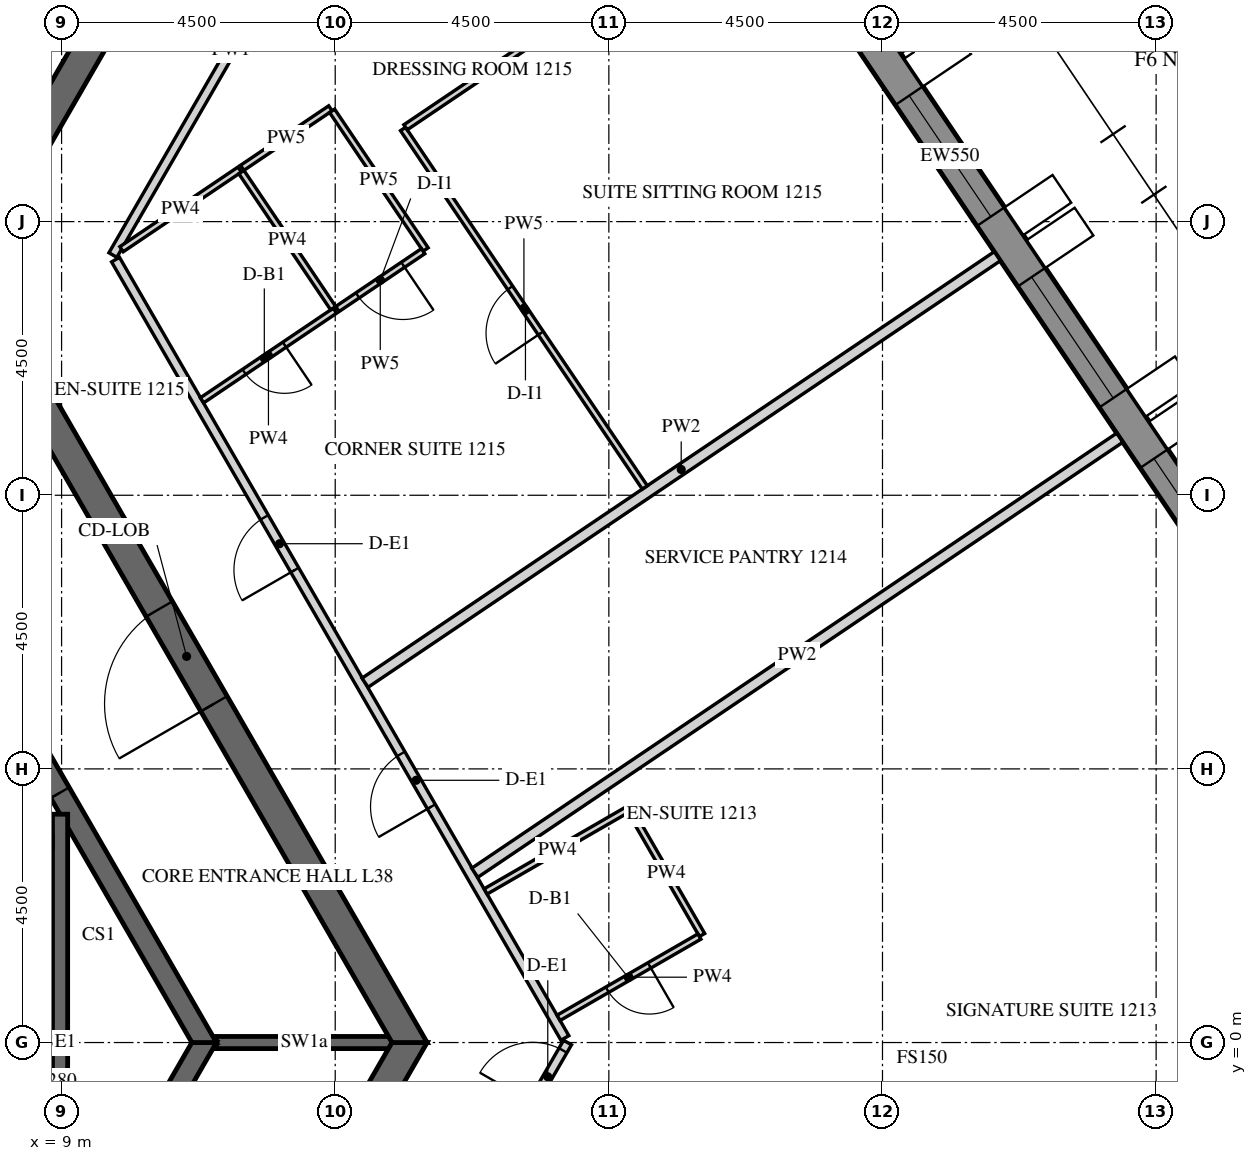
"""IFC4 building model, lengths in metres.
Left out: names, types, materials, properties, quantities, classifications, styles, units other than length and angle.
Written with IfcOpenShell. Run it as: python <this file> out.ifc"""

import sys

from ifc_helpers import new_model, si_unit, direction, frame, frame_2d, origin, place, context, subcontext, project, spatial, polyline, rectangle, outline, extrude, element, fill, save


model = new_model("IFC4")
c1 = context("Model", 3, precision=1e-05, world=origin(), true_north=direction((0.0, 1.0)))
c2 = subcontext(c1, "Body", "Model", "MODEL_VIEW")
j1 = project(units=[si_unit("LENGTHUNIT", "METRE"), si_unit("PLANEANGLEUNIT", "RADIAN")], contexts=[c1])
p1 = place(None, origin())
s1 = spatial("IfcSite", under=j1, at=p1, CompositionType="ELEMENT")
p2 = place(p1, origin())
s2 = spatial("IfcBuilding", under=s1, at=p2, CompositionType="ELEMENT")
p3 = place(p2, frame((0.0, 0.0, 164.4)))
s3 = spatial("IfcBuildingStorey", under=s2, at=p3, CompositionType="ELEMENT", Elevation=164.4)
p4 = place(p3, frame((31.371, 3.071, -0.15), z_axis=(0.0, 0.0, 1.0), x_axis=(-0.559189891278, 0.829039604297, 0.0)))
e1 = element("IfcWall", 1, at=p4, inside=s3, PredefinedType="SOLIDWALL", context=c2, shape_type="SweptSolid", body=[
    extrude(outline(polyline([(-0.026, -0.275), (27.781, -0.275), (27.736, 0.275), (0.026, 0.275), (-0.026, -0.275)])), origin(), (0.0, 0.0, 1.0), 3.9),
])
p5 = place(p4, frame((1.879, 0.0, 1.05)))
e2 = element("IfcOpeningElement", 2, at=p5, cuts=e1, PredefinedType="OPENING", context=c2, shape_type="SweptSolid", body=[
    extrude(rectangle(XDim=2.4, YDim=2.4, at=frame_2d((1.2, 1.2))), frame((0.0, 0.285, 0.0), z_axis=(0.0, -1.0, 0.0), x_axis=(1.0, 0.0, 0.0)), (0.0, 0.0, 1.0), 0.57),
])
p6 = place(p4, frame((5.479, 0.0, 1.05)))
e3 = element("IfcOpeningElement", 3, at=p6, cuts=e1, PredefinedType="OPENING", context=c2, shape_type="SweptSolid", body=[
    extrude(rectangle(XDim=2.4, YDim=2.4, at=frame_2d((1.2, 1.2))), frame((0.0, 0.285, 0.0), z_axis=(0.0, -1.0, 0.0), x_axis=(1.0, 0.0, 0.0)), (0.0, 0.0, 1.0), 0.57),
])
p7 = place(p4, frame((9.079, 0.0, 1.05)))
e4 = element("IfcOpeningElement", 4, at=p7, cuts=e1, PredefinedType="OPENING", context=c2, shape_type="SweptSolid", body=[
    extrude(rectangle(XDim=2.4, YDim=2.4, at=frame_2d((1.2, 1.2))), frame((0.0, 0.285, 0.0), z_axis=(0.0, -1.0, 0.0), x_axis=(1.0, 0.0, 0.0)), (0.0, 0.0, 1.0), 0.57),
])
p8 = place(p4, frame((12.679, 0.0, 1.05)))
e5 = element("IfcOpeningElement", 5, at=p8, cuts=e1, PredefinedType="OPENING", context=c2, shape_type="SweptSolid", body=[
    extrude(rectangle(XDim=2.4, YDim=2.4, at=frame_2d((1.2, 1.2))), frame((0.0, 0.285, 0.0), z_axis=(0.0, -1.0, 0.0), x_axis=(1.0, 0.0, 0.0)), (0.0, 0.0, 1.0), 0.57),
])
p9 = place(p4, frame((16.279, 0.0, 1.05)))
e6 = element("IfcOpeningElement", 6, at=p9, cuts=e1, PredefinedType="OPENING", context=c2, shape_type="SweptSolid", body=[
    extrude(rectangle(XDim=2.4, YDim=2.4, at=frame_2d((1.2, 1.2))), frame((0.0, 0.285, 0.0), z_axis=(0.0, -1.0, 0.0), x_axis=(1.0, 0.0, 0.0)), (0.0, 0.0, 1.0), 0.57),
])
p10 = place(p4, frame((19.879, 0.0, 1.05)))
e7 = element("IfcOpeningElement", 7, at=p10, cuts=e1, PredefinedType="OPENING", context=c2, shape_type="SweptSolid", body=[
    extrude(rectangle(XDim=2.4, YDim=2.4, at=frame_2d((1.2, 1.2))), frame((0.0, 0.285, 0.0), z_axis=(0.0, -1.0, 0.0), x_axis=(1.0, 0.0, 0.0)), (0.0, 0.0, 1.0), 0.57),
])
p11 = place(p4, frame((23.479, 0.0, 1.05)))
e8 = element("IfcOpeningElement", 8, at=p11, cuts=e1, PredefinedType="OPENING", context=c2, shape_type="SweptSolid", body=[
    extrude(rectangle(XDim=2.4, YDim=2.4, at=frame_2d((1.2, 1.2))), frame((0.0, 0.285, 0.0), z_axis=(0.0, -1.0, 0.0), x_axis=(1.0, 0.0, 0.0)), (0.0, 0.0, 1.0), 0.57),
])
p12 = place(p3, frame((7.361, -12.75, -0.15), z_axis=(0.0, 0.0, 1.0), x_axis=(0.50000571537, 0.866022103989, 0.0)))
e9 = element("IfcWall", 9, at=p12, inside=s3, PredefinedType="SHEAR", context=c2, shape_type="SweptSolid", body=[
    extrude(outline(polyline([(-0.144, -0.25), (14.867, -0.25), (14.578, 0.25), (0.144, 0.25), (-0.144, -0.25)])), origin(), (0.0, 0.0, 1.0), 3.9),
])
p13 = place(p12, frame((6.49, 0.0, 0.15)))
e10 = element("IfcOpeningElement", 10, at=p13, cuts=e9, PredefinedType="OPENING", context=c2, shape_type="SweptSolid", body=[
    extrude(rectangle(XDim=1.8, YDim=2.4, at=frame_2d((0.9, 1.2))), frame((0.0, 0.26, 0.0), z_axis=(0.0, -1.0, 0.0), x_axis=(1.0, 0.0, 0.0)), (0.0, 0.0, 1.0), 0.52),
])
p14 = place(p3, frame((14.722, 0.0, -0.15), z_axis=(0.0, 0.0, 1.0), x_axis=(-0.50000571537, 0.866022103989, 0.0)))
e11 = element("IfcWall", 11, at=p14, inside=s3, PredefinedType="SHEAR", context=c2, shape_type="SweptSolid", body=[
    extrude(outline(polyline([(-0.144, -0.25), (14.867, -0.25), (14.578, 0.25), (0.144, 0.25), (-0.144, -0.25)])), origin(), (0.0, 0.0, 1.0), 3.9),
])
p15 = place(p14, frame((6.432, 0.0, 0.15)))
e12 = element("IfcOpeningElement", 12, at=p15, cuts=e11, PredefinedType="OPENING", context=c2, shape_type="SweptSolid", body=[
    extrude(rectangle(XDim=1.8, YDim=2.4, at=frame_2d((0.9, 1.2))), frame((0.0, 0.26, 0.0), z_axis=(0.0, -1.0, 0.0), x_axis=(1.0, 0.0, 0.0)), (0.0, 0.0, 1.0), 0.52),
])
p16 = place(p3, frame((7.506, 13.0, -0.15), z_axis=(0.0, 0.0, 1.0), x_axis=(0.499988271576, 0.866032175087, 0.0)))
e13 = element("IfcWall", 13, at=p16, inside=s3, PredefinedType="SHEAR", context=c2, shape_type="SweptSolid", body=[
    extrude(rectangle(XDim=15.424, YDim=0.5, at=frame_2d((7.712, 0.0))), origin(), (0.0, 0.0, 1.0), 3.9),
])
p17 = place(p16, frame((6.812, 0.0, 0.15)))
e14 = element("IfcOpeningElement", 14, at=p17, cuts=e13, PredefinedType="OPENING", context=c2, shape_type="SweptSolid", body=[
    extrude(rectangle(XDim=1.8, YDim=2.4, at=frame_2d((0.9, 1.2))), frame((0.0, 0.26, 0.0), z_axis=(0.0, -1.0, 0.0), x_axis=(1.0, 0.0, 0.0)), (0.0, 0.0, 1.0), 0.52),
])
p18 = place(p3, frame((5.673, -9.825, -0.15), z_axis=(0.0, 0.0, 1.0), x_axis=(0.499995046907, 0.866028263435, 0.0)))
e15 = element("IfcWall", 15, at=p18, inside=s3, PredefinedType="SHEAR", context=c2, shape_type="SweptSolid", body=[
    extrude(outline(polyline([(-0.101, -0.175), (11.446, -0.175), (11.244, 0.175), (0.101, 0.175), (-0.101, -0.175)])), origin(), (0.0, 0.0, 1.0), 3.9),
])
p19 = place(p18, frame((4.801, 0.0, 0.15)))
e16 = element("IfcOpeningElement", 16, at=p19, cuts=e15, PredefinedType="OPENING", context=c2, shape_type="SweptSolid", body=[
    extrude(rectangle(XDim=1.8, YDim=2.4, at=frame_2d((0.9, 1.2))), frame((0.0, 0.185, 0.0), z_axis=(0.0, -1.0, 0.0), x_axis=(1.0, 0.0, 0.0)), (0.0, 0.0, 1.0), 0.37),
])
p20 = place(p3, frame((11.345, 0.0, -0.15), z_axis=(0.0, 0.0, 1.0), x_axis=(-0.499995046907, 0.866028263435, 0.0)))
e17 = element("IfcWall", 17, at=p20, inside=s3, PredefinedType="SHEAR", context=c2, shape_type="SweptSolid", body=[
    extrude(outline(polyline([(-0.101, -0.175), (11.446, -0.175), (11.244, 0.175), (0.101, 0.175), (-0.101, -0.175)])), origin(), (0.0, 0.0, 1.0), 3.9),
])
p21 = place(p20, frame((4.744, 0.0, 0.15)))
e18 = element("IfcOpeningElement", 18, at=p21, cuts=e17, PredefinedType="OPENING", context=c2, shape_type="SweptSolid", body=[
    extrude(rectangle(XDim=1.8, YDim=2.4, at=frame_2d((0.9, 1.2))), frame((0.0, 0.185, 0.0), z_axis=(0.0, -1.0, 0.0), x_axis=(1.0, 0.0, 0.0)), (0.0, 0.0, 1.0), 0.37),
])
p22 = place(p3, frame((11.547, 0.0, -0.15), z_axis=(0.0, 0.0, 1.0), x_axis=(1.0, 0.0, 0.0)))
e19 = element("IfcWall", 19, at=p22, inside=s3, PredefinedType="SHEAR", context=c2, shape_type="SweptSolid", body=[
    extrude(rectangle(XDim=2.887, YDim=0.2, at=frame_2d((1.443, 0.0))), origin(), (0.0, 0.0, 1.0), 3.9),
])
p23 = place(p3, frame((8.975, -3.755, -0.25), z_axis=(0.0, 0.0, 1.0), x_axis=(0.0, 1.0, 0.0)))
e20 = element("IfcWall", 20, at=p23, inside=s3, PredefinedType="SHEAR", context=c2, shape_type="SweptSolid", body=[
    extrude(rectangle(XDim=7.51, YDim=0.25, at=frame_2d((3.755, 0.0))), origin(), (0.0, 0.0, 1.0), 3.9),
])
p24 = place(p3, frame((5.9, 3.3, -0.25), z_axis=(0.0, 0.0, 1.0), x_axis=(1.0, 0.0, 0.0)))
e21 = element("IfcWall", 21, at=p24, inside=s3, PredefinedType="SHEAR", context=c2, shape_type="SweptSolid", body=[
    extrude(rectangle(XDim=2.95, YDim=0.2, at=frame_2d((1.475, 0.0))), origin(), (0.0, 0.0, 1.0), 3.9),
])
p25 = place(p3, frame((10.149, 21.678, 0.0), z_axis=(0.0, 0.0, 1.0), x_axis=(-0.499993780622, -0.866028994514, 0.0)))
e22 = element("IfcWall", 22, at=p25, inside=s3, PredefinedType="PARTITIONING", context=c2, shape_type="SweptSolid", body=[
    extrude(rectangle(XDim=7.711, YDim=0.15, at=frame_2d((3.855, 0.0))), origin(), (0.0, 0.0, 1.0), 2.988),
])
p26 = place(p3, frame((10.887, -11.144, 0.0), z_axis=(0.0, 0.0, 1.0), x_axis=(0.500006037985, 0.866021917724, 0.0)))
e23 = element("IfcWall", 23, at=p26, inside=s3, PredefinedType="PARTITIONING", context=c2, shape_type="SweptSolid", body=[
    extrude(rectangle(XDim=12.867, YDim=0.15, at=frame_2d((6.434, 0.0))), origin(), (0.0, 0.0, 1.0), 2.988),
])
p27 = place(p26, frame((6.225, 0.0, 0.0)))
e24 = element("IfcOpeningElement", 24, at=p27, cuts=e23, PredefinedType="OPENING", context=c2, shape_type="SweptSolid", body=[
    extrude(rectangle(XDim=1.0, YDim=2.1, at=frame_2d((0.5, 1.05))), frame((0.0, 0.085, 0.0), z_axis=(0.0, -1.0, 0.0), x_axis=(1.0, 0.0, 0.0)), (0.0, 0.0, 1.0), 0.17),
])
p28 = place(p26, frame((11.717, 0.0, 0.0)))
e25 = element("IfcOpeningElement", 25, at=p28, cuts=e23, PredefinedType="OPENING", context=c2, shape_type="SweptSolid", body=[
    extrude(rectangle(XDim=1.0, YDim=2.1, at=frame_2d((0.5, 1.05))), frame((0.0, 0.085, 0.0), z_axis=(0.0, -1.0, 0.0), x_axis=(1.0, 0.0, 0.0)), (0.0, 0.0, 1.0), 0.17),
])
p29 = place(p3, frame((17.277, 0.075, 0.0), z_axis=(0.0, 0.0, 1.0), x_axis=(-0.499988884089, 0.866031821464, 0.0)))
e26 = element("IfcWall", 26, at=p29, inside=s3, PredefinedType="PARTITIONING", context=c2, shape_type="SweptSolid", body=[
    extrude(rectangle(XDim=14.78, YDim=0.15, at=frame_2d((7.39, 0.0))), origin(), (0.0, 0.0, 1.0), 2.988),
])
p30 = place(p29, frame((4.393, 0.0, 0.0)))
e27 = element("IfcOpeningElement", 27, at=p30, cuts=e26, PredefinedType="OPENING", context=c2, shape_type="SweptSolid", body=[
    extrude(rectangle(XDim=1.0, YDim=2.1, at=frame_2d((0.5, 1.05))), frame((0.0, 0.085, 0.0), z_axis=(0.0, -1.0, 0.0), x_axis=(1.0, 0.0, 0.0)), (0.0, 0.0, 1.0), 0.17),
])
p31 = place(p29, frame((8.885, 0.0, 0.0)))
e28 = element("IfcOpeningElement", 28, at=p31, cuts=e26, PredefinedType="OPENING", context=c2, shape_type="SweptSolid", body=[
    extrude(rectangle(XDim=1.0, YDim=2.1, at=frame_2d((0.5, 1.05))), frame((0.0, 0.085, 0.0), z_axis=(0.0, -1.0, 0.0), x_axis=(1.0, 0.0, 0.0)), (0.0, 0.0, 1.0), 0.17),
])
p32 = place(p3, frame((9.844, 12.95, 0.0), z_axis=(0.0, 0.0, 1.0), x_axis=(0.500003831281, 0.866023191782, 0.0)))
e29 = element("IfcWall", 29, at=p32, inside=s3, PredefinedType="PARTITIONING", context=c2, shape_type="SweptSolid", body=[
    extrude(rectangle(XDim=7.786, YDim=0.15, at=frame_2d((3.893, 0.0))), origin(), (0.0, 0.0, 1.0), 2.988),
])
p33 = place(p3, frame((15.973, 2.484, 0.0), z_axis=(0.0, 0.0, 1.0), x_axis=(0.866051307416, 0.49995513091, 0.0)))
e30 = element("IfcWall", 30, at=p33, inside=s3, PredefinedType="PARTITIONING", context=c2, shape_type="SweptSolid", body=[
    extrude(rectangle(XDim=2.725, YDim=0.1, at=frame_2d((1.362, 0.0))), origin(), (0.0, 0.0, 1.0), 2.988),
])
p34 = place(p3, frame((18.358, 3.803, 0.0), z_axis=(0.0, 0.0, 1.0), x_axis=(0.500016218704, -0.866016039709, 0.0)))
e31 = element("IfcWall", 31, at=p34, inside=s3, PredefinedType="PARTITIONING", context=c2, shape_type="SweptSolid", body=[
    extrude(rectangle(XDim=2.35, YDim=0.1, at=frame_2d((1.175, 0.0))), origin(), (0.0, 0.0, 1.0), 2.988),
])
p35 = place(p3, frame((19.49, 1.743, 0.0), z_axis=(0.0, 0.0, 1.0), x_axis=(-0.866004723184, -0.50003581814, 0.0)))
e32 = element("IfcWall", 32, at=p35, inside=s3, PredefinedType="PARTITIONING", context=c2, shape_type="SweptSolid", body=[
    extrude(rectangle(XDim=2.675, YDim=0.1, at=frame_2d((1.337, 0.0))), origin(), (0.0, 0.0, 1.0), 2.988),
])
p36 = place(p35, frame((0.95, 0.0, 0.0)))
e33 = element("IfcOpeningElement", 33, at=p36, cuts=e32, PredefinedType="OPENING", context=c2, shape_type="SweptSolid", body=[
    extrude(rectangle(XDim=0.8, YDim=2.1, at=frame_2d((0.4, 1.05))), frame((0.0, 0.06, 0.0), z_axis=(0.0, -1.0, 0.0), x_axis=(1.0, 0.0, 0.0)), (0.0, 0.0, 1.0), 0.12),
])
p37 = place(p3, frame((26.402, 9.946, 0.0), z_axis=(0.0, 0.0, 1.0), x_axis=(-0.829037771727, -0.559192608187, 0.0)))
e34 = element("IfcWall", 34, at=p37, inside=s3, PredefinedType="PARTITIONING", context=c2, shape_type="SweptSolid", body=[
    extrude(rectangle(XDim=12.794, YDim=0.18, at=frame_2d((6.397, 0.0))), origin(), (0.0, 0.0, 1.0), 2.988),
])
p38 = place(p3, frame((24.389, 12.931, 0.0), z_axis=(0.0, 0.0, 1.0), x_axis=(-0.829040439793, -0.559188652593, 0.0)))
e35 = element("IfcWall", 35, at=p38, inside=s3, PredefinedType="PARTITIONING", context=c2, shape_type="SweptSolid", body=[
    extrude(rectangle(XDim=12.542, YDim=0.18, at=frame_2d((6.271, 0.0))), origin(), (0.0, 0.0, 1.0), 2.988),
])
p39 = place(p3, frame((9.986, 13.046, 0.0), z_axis=(0.0, 0.0, 1.0), x_axis=(0.829041811541, 0.559186618865, 0.0)))
e36 = element("IfcWall", 36, at=p39, inside=s3, PredefinedType="PARTITIONING", context=c2, shape_type="SweptSolid", body=[
    extrude(rectangle(XDim=2.344, YDim=0.1, at=frame_2d((1.172, 0.0))), origin(), (0.0, 0.0, 1.0), 2.988),
])
p40 = place(p3, frame((13.495, 12.035, 0.0), z_axis=(0.0, 0.0, 1.0), x_axis=(-0.829031183816, -0.55920237505, 0.0)))
e37 = element("IfcWall", 37, at=p40, inside=s3, PredefinedType="PARTITIONING", context=c2, shape_type="SweptSolid", body=[
    extrude(rectangle(XDim=2.636, YDim=0.1, at=frame_2d((1.318, 0.0))), origin(), (0.0, 0.0, 1.0), 2.988),
])
p41 = place(p40, frame((1.0, 0.0, 0.0)))
e38 = element("IfcOpeningElement", 38, at=p41, cuts=e37, PredefinedType="OPENING", context=c2, shape_type="SweptSolid", body=[
    extrude(rectangle(XDim=0.8, YDim=2.1, at=frame_2d((0.4, 1.05))), frame((0.0, 0.06, 0.0), z_axis=(0.0, -1.0, 0.0), x_axis=(1.0, 0.0, 0.0)), (0.0, 0.0, 1.0), 0.12),
])
p42 = place(p3, frame((11.97, 14.384, 0.0), z_axis=(0.0, 0.0, 1.0), x_axis=(0.828968337787, 0.559295534532, 0.0)))
e39 = element("IfcWall", 39, at=p42, inside=s3, PredefinedType="PARTITIONING", context=c2, shape_type="SweptSolid", body=[
    extrude(rectangle(XDim=1.75, YDim=0.1, at=frame_2d((0.875, 0.0))), origin(), (0.0, 0.0, 1.0), 2.988),
])
p43 = place(p3, frame((13.449, 15.322, 0.0), z_axis=(0.0, 0.0, 1.0), x_axis=(0.559158698756, -0.8290606429, 0.0)))
e40 = element("IfcWall", 40, at=p43, inside=s3, PredefinedType="PARTITIONING", context=c2, shape_type="SweptSolid", body=[
    extrude(rectangle(XDim=2.75, YDim=0.1, at=frame_2d((1.375, 0.0))), origin(), (0.0, 0.0, 1.0), 2.988),
])
p44 = place(p3, frame((14.946, 13.014, 0.0), z_axis=(0.0, 0.0, 1.0), x_axis=(-0.829033422808, -0.559199055675, 0.0)))
e41 = element("IfcWall", 41, at=p44, inside=s3, PredefinedType="PARTITIONING", context=c2, shape_type="SweptSolid", body=[
    extrude(rectangle(XDim=1.7, YDim=0.1, at=frame_2d((0.85, 0.0))), origin(), (0.0, 0.0, 1.0), 2.988),
])
p45 = place(p44, frame((0.4, 0.0, 0.0)))
e42 = element("IfcOpeningElement", 42, at=p45, cuts=e41, PredefinedType="OPENING", context=c2, shape_type="SweptSolid", body=[
    extrude(rectangle(XDim=0.9, YDim=2.1, at=frame_2d((0.45, 1.05))), frame((0.0, 0.06, 0.0), z_axis=(0.0, -1.0, 0.0), x_axis=(1.0, 0.0, 0.0)), (0.0, 0.0, 1.0), 0.12),
])
p46 = place(p3, frame((18.591, 9.129, 0.0), z_axis=(0.0, 0.0, 1.0), x_axis=(-0.559185029686, 0.829042883435, 0.0)))
e43 = element("IfcWall", 43, at=p46, inside=s3, PredefinedType="PARTITIONING", context=c2, shape_type="SweptSolid", body=[
    extrude(rectangle(XDim=7.11, YDim=0.1, at=frame_2d((3.555, 0.0))), origin(), (0.0, 0.0, 1.0), 2.988),
])
p47 = place(p46, frame((3.06, 0.0, 0.0)))
e44 = element("IfcOpeningElement", 44, at=p47, cuts=e43, PredefinedType="OPENING", context=c2, shape_type="SweptSolid", body=[
    extrude(rectangle(XDim=0.9, YDim=2.1, at=frame_2d((0.45, 1.05))), frame((0.0, 0.06, 0.0), z_axis=(0.0, -1.0, 0.0), x_axis=(1.0, 0.0, 0.0)), (0.0, 0.0, 1.0), 0.12),
])
p48 = place(p3, frame((14.657, 15.051, 0.0), z_axis=(0.0, 0.0, 1.0), x_axis=(0.829036561965, 0.559194401729, 0.0)))
e45 = element("IfcWall", 45, at=p48, inside=s3, PredefinedType="PARTITIONING", context=c2, shape_type="SweptSolid", body=[
    extrude(rectangle(XDim=6.883, YDim=0.1, at=frame_2d((3.441, 0.0))), origin(), (0.0, 0.0, 1.0), 2.988),
])
p49 = place(p3, frame((13.467, 12.077, 0.0), z_axis=(0.0, 0.0, 1.0), x_axis=(-0.559261631576, 0.828991210718, 0.0)))
e46 = element("IfcWall", 46, at=p49, inside=s3, PredefinedType="PARTITIONING", context=c2, shape_type="SweptSolid", body=[
    extrude(rectangle(XDim=2.7, YDim=0.1, at=frame_2d((1.35, 0.0))), origin(), (0.0, 0.0, 1.0), 2.988),
])
p50 = place(p6, frame((0.0, 0.205, 0.0)))
e47 = element("IfcWindow", 47, at=p50, inside=s3, PartitioningType="DOUBLE_PANEL_VERTICAL", PredefinedType="WINDOW", context=c2, shape_type="SweptSolid", body=[
    extrude(rectangle(XDim=2.4, YDim=2.4, at=frame_2d((1.2, 1.2))), frame((0.0, 0.03, 0.0), z_axis=(0.0, -1.0, 0.0), x_axis=(1.0, 0.0, 0.0)), (0.0, 0.0, 1.0), 0.06),
])
fill(e3, e47)
p51 = place(p7, frame((0.0, 0.205, 0.0)))
e48 = element("IfcWindow", 48, at=p51, inside=s3, PartitioningType="DOUBLE_PANEL_VERTICAL", PredefinedType="WINDOW", context=c2, shape_type="SweptSolid", body=[
    extrude(rectangle(XDim=2.4, YDim=2.4, at=frame_2d((1.2, 1.2))), frame((0.0, 0.03, 0.0), z_axis=(0.0, -1.0, 0.0), x_axis=(1.0, 0.0, 0.0)), (0.0, 0.0, 1.0), 0.06),
])
fill(e4, e48)
p52 = place(p8, frame((0.0, 0.205, 0.0)))
e49 = element("IfcWindow", 49, at=p52, inside=s3, PartitioningType="DOUBLE_PANEL_VERTICAL", PredefinedType="WINDOW", context=c2, shape_type="SweptSolid", body=[
    extrude(rectangle(XDim=2.4, YDim=2.4, at=frame_2d((1.2, 1.2))), frame((0.0, 0.03, 0.0), z_axis=(0.0, -1.0, 0.0), x_axis=(1.0, 0.0, 0.0)), (0.0, 0.0, 1.0), 0.06),
])
fill(e5, e49)
p53 = place(p15, origin())
e50 = element("IfcDoor", 50, at=p53, inside=s3, OperationType="DOUBLE_DOOR_SINGLE_SWING", PredefinedType="DOOR", context=c2, shape_type="SweptSolid", body=[
    extrude(rectangle(XDim=1.8, YDim=2.4, at=frame_2d((0.9, 1.2))), frame((0.0, 0.025, 0.0), z_axis=(0.0, -1.0, 0.0), x_axis=(1.0, 0.0, 0.0)), (0.0, 0.0, 1.0), 0.05),
])
fill(e12, e50)
p54 = place(p21, origin())
e51 = element("IfcDoor", 51, at=p54, inside=s3, OperationType="DOUBLE_DOOR_SINGLE_SWING", PredefinedType="DOOR", context=c2, shape_type="SweptSolid", body=[
    extrude(rectangle(XDim=1.8, YDim=2.4, at=frame_2d((0.9, 1.2))), frame((0.0, 0.025, 0.0), z_axis=(0.0, -1.0, 0.0), x_axis=(1.0, 0.0, 0.0)), (0.0, 0.0, 1.0), 0.05),
])
fill(e18, e51)
p55 = place(p28, origin())
e52 = element("IfcDoor", 52, at=p55, inside=s3, OperationType="SINGLE_SWING_LEFT", PredefinedType="DOOR", context=c2, shape_type="SweptSolid", body=[
    extrude(rectangle(XDim=1.0, YDim=2.1, at=frame_2d((0.5, 1.05))), frame((0.0, 0.025, 0.0), z_axis=(0.0, -1.0, 0.0), x_axis=(1.0, 0.0, 0.0)), (0.0, 0.0, 1.0), 0.05),
])
fill(e25, e52)
p56 = place(p36, origin())
e53 = element("IfcDoor", 53, at=p56, inside=s3, OperationType="SINGLE_SWING_RIGHT", PredefinedType="DOOR", context=c2, shape_type="SweptSolid", body=[
    extrude(rectangle(XDim=0.8, YDim=2.1, at=frame_2d((0.4, 1.05))), frame((0.0, 0.025, 0.0), z_axis=(0.0, -1.0, 0.0), x_axis=(1.0, 0.0, 0.0)), (0.0, 0.0, 1.0), 0.05),
])
fill(e33, e53)
p57 = place(p30, origin())
e54 = element("IfcDoor", 54, at=p57, inside=s3, OperationType="SINGLE_SWING_LEFT", PredefinedType="DOOR", context=c2, shape_type="SweptSolid", body=[
    extrude(rectangle(XDim=1.0, YDim=2.1, at=frame_2d((0.5, 1.05))), frame((0.0, 0.025, 0.0), z_axis=(0.0, -1.0, 0.0), x_axis=(1.0, 0.0, 0.0)), (0.0, 0.0, 1.0), 0.05),
])
fill(e27, e54)
p58 = place(p31, origin())
e55 = element("IfcDoor", 55, at=p58, inside=s3, OperationType="SINGLE_SWING_RIGHT", PredefinedType="DOOR", context=c2, shape_type="SweptSolid", body=[
    extrude(rectangle(XDim=1.0, YDim=2.1, at=frame_2d((0.5, 1.05))), frame((0.0, 0.025, 0.0), z_axis=(0.0, -1.0, 0.0), x_axis=(1.0, 0.0, 0.0)), (0.0, 0.0, 1.0), 0.05),
])
fill(e28, e55)
p59 = place(p41, origin())
e56 = element("IfcDoor", 56, at=p59, inside=s3, OperationType="SINGLE_SWING_LEFT", PredefinedType="DOOR", context=c2, shape_type="SweptSolid", body=[
    extrude(rectangle(XDim=0.8, YDim=2.1, at=frame_2d((0.4, 1.05))), frame((0.0, 0.025, 0.0), z_axis=(0.0, -1.0, 0.0), x_axis=(1.0, 0.0, 0.0)), (0.0, 0.0, 1.0), 0.05),
])
fill(e38, e56)
p60 = place(p45, origin())
e57 = element("IfcDoor", 57, at=p60, inside=s3, OperationType="SINGLE_SWING_RIGHT", PredefinedType="DOOR", context=c2, shape_type="SweptSolid", body=[
    extrude(rectangle(XDim=0.9, YDim=2.1, at=frame_2d((0.45, 1.05))), frame((0.0, 0.025, 0.0), z_axis=(0.0, -1.0, 0.0), x_axis=(1.0, 0.0, 0.0)), (0.0, 0.0, 1.0), 0.05),
])
fill(e42, e57)
p61 = place(p47, origin())
e58 = element("IfcDoor", 58, at=p61, inside=s3, OperationType="SINGLE_SWING_RIGHT", PredefinedType="DOOR", context=c2, shape_type="SweptSolid", body=[
    extrude(rectangle(XDim=0.9, YDim=2.1, at=frame_2d((0.45, 1.05))), frame((0.0, 0.025, 0.0), z_axis=(0.0, -1.0, 0.0), x_axis=(1.0, 0.0, 0.0)), (0.0, 0.0, 1.0), 0.05),
])
fill(e44, e58)
save(model, sys.argv[1])
